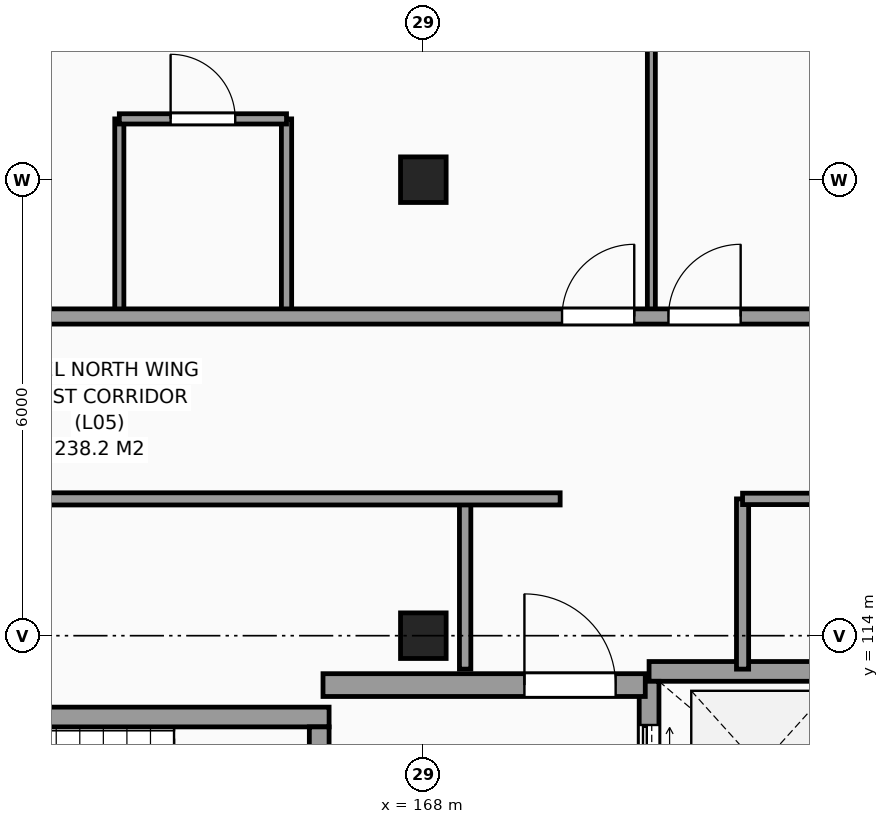
"""IFC4 building model, lengths in metres.
Left out: names, types, materials, properties, quantities, classifications, styles, units other than length and angle.
Written with IfcOpenShell. Run it as: python <this file> out.ifc"""

import sys

from ifc_helpers import new_model, si_unit, direction, frame, frame_2d, origin, origin_2d, place, context, subcontext, project, spatial, rectangle, extrude, element, fill, save


model = new_model("IFC4")
c1 = context("Model", 3, precision=1e-05, world=origin(), true_north=direction((0.0, 1.0)))
c2 = subcontext(c1, "Body", "Model", "MODEL_VIEW")
j1 = project(units=[si_unit("LENGTHUNIT", "METRE"), si_unit("PLANEANGLEUNIT", "RADIAN")], contexts=[c1])
p1 = place(None, origin())
s1 = spatial("IfcSite", under=j1, at=p1, CompositionType="ELEMENT")
p2 = place(p1, origin())
s2 = spatial("IfcBuilding", under=s1, at=p2, CompositionType="ELEMENT")
p3 = place(p2, frame((0.0, 0.0, 24.6)))
s3 = spatial("IfcBuildingStorey", under=s2, at=p3, CompositionType="ELEMENT", Elevation=24.6)
for number, where, z_axis, x_axis in (
    (1, (168.0, 114.0, 0.0), (0.0, 0.0, 1.0), (1.0, 0.0, 0.0)),
    (2, (168.0, 120.0, 0.0), (0.0, 0.0, 1.0), (1.0, 0.0, 0.0)),
):
    element("IfcColumn", number, at=place(p3, frame(where, z_axis=z_axis, x_axis=x_axis)), inside=s3, PredefinedType="COLUMN", context=c2, shape_type="SweptSolid", body=[
        extrude(rectangle(XDim=0.6, YDim=0.6, at=origin_2d()), origin(), (0.0, 0.0, 1.0), 3.6),
    ])
p4 = place(p3, frame((156.04, 112.93, 0.0), z_axis=(0.0, 0.0, 1.0), x_axis=(1.0, 0.0, 0.0)))
e3 = element("IfcWall", 3, at=p4, inside=s3, PredefinedType="SHEAR", context=c2, shape_type="SweptSolid", body=[
    extrude(rectangle(XDim=10.72, YDim=0.26, at=frame_2d((5.36, 0.0))), origin(), (0.0, 0.0, 1.0), 3.6),
])
p5 = place(p3, frame((166.63, 109.2, 0.0), z_axis=(0.0, 0.0, 1.0), x_axis=(0.0, 1.0, 0.0)))
e4 = element("IfcWall", 4, at=p5, inside=s3, PredefinedType="SHEAR", context=c2, shape_type="SweptSolid", body=[
    extrude(rectangle(XDim=3.6, YDim=0.26, at=frame_2d((1.8, 0.0))), origin(), (0.0, 0.0, 1.0), 3.6),
])
p6 = place(p5, frame((1.25, 0.0, 0.0)))
e5 = element("IfcOpeningElement", 5, at=p6, cuts=e4, PredefinedType="OPENING", context=c2, shape_type="SweptSolid", body=[
    extrude(rectangle(XDim=1.1, YDim=2.15, at=frame_2d((0.55, 1.075))), frame((0.0, 0.14, 0.0), z_axis=(0.0, -1.0, 0.0), x_axis=(1.0, 0.0, 0.0)), (0.0, 0.0, 1.0), 0.28),
])
p7 = place(p3, frame((170.97, 113.53, 0.0), z_axis=(0.0, 0.0, 1.0), x_axis=(1.0, 0.0, 0.0)))
e6 = element("IfcWall", 6, at=p7, inside=s3, PredefinedType="SHEAR", context=c2, shape_type="SweptSolid", body=[
    extrude(rectangle(XDim=2.91, YDim=0.26, at=frame_2d((1.455, 0.0))), origin(), (0.0, 0.0, 1.0), 3.6),
])
p8 = place(p3, frame((170.97, 111.15, 0.0), z_axis=(0.0, 0.0, 1.0), x_axis=(0.0, 1.0, 0.0)))
e7 = element("IfcWall", 7, at=p8, inside=s3, PredefinedType="SHEAR", context=c2, shape_type="SweptSolid", body=[
    extrude(rectangle(XDim=2.25, YDim=0.26, at=frame_2d((1.125, 0.0))), origin(), (0.0, 0.0, 1.0), 3.6),
])
p9 = place(p8, frame((0.575, 0.0, 0.0)))
e8 = element("IfcOpeningElement", 8, at=p9, cuts=e7, PredefinedType="OPENING", context=c2, shape_type="SweptSolid", body=[
    extrude(rectangle(XDim=1.1, YDim=2.2, at=frame_2d((0.55, 1.1))), frame((0.0, 0.14, 0.0), z_axis=(0.0, -1.0, 0.0), x_axis=(1.0, 0.0, 0.0)), (0.0, 0.0, 1.0), 0.28),
])
p10 = place(p3, frame((166.68, 113.35, 0.0), z_axis=(0.0, 0.0, 1.0), x_axis=(1.0, 0.0, 0.0)))
e9 = element("IfcWall", 9, at=p10, inside=s3, PredefinedType="SHEAR", context=c2, shape_type="SweptSolid", body=[
    extrude(rectangle(XDim=4.24, YDim=0.3, at=frame_2d((2.12, 0.0))), origin(), (0.0, 0.0, 1.0), 3.6),
])
p11 = place(p10, frame((2.65, 0.0, 0.0)))
e10 = element("IfcOpeningElement", 10, at=p11, cuts=e9, PredefinedType="OPENING", context=c2, shape_type="SweptSolid", body=[
    extrude(rectangle(XDim=1.2, YDim=2.2, at=frame_2d((0.6, 1.1))), frame((0.0, 0.16, 0.0), z_axis=(0.0, -1.0, 0.0), x_axis=(1.0, 0.0, 0.0)), (0.0, 0.0, 1.0), 0.32),
])
p12 = place(p3, frame((164.0, 118.2, 0.0), z_axis=(0.0, 0.0, 1.0), x_axis=(0.0, 1.0, 0.0)))
e11 = element("IfcWall", 11, at=p12, inside=s3, PredefinedType="PARTITIONING", context=c2, shape_type="SweptSolid", body=[
    extrude(rectangle(XDim=2.6, YDim=0.12, at=frame_2d((1.3, 0.0))), origin(), (0.0, 0.0, 1.0), 3.38),
])
p13 = place(p3, frame((166.2, 118.2, 0.0), z_axis=(0.0, 0.0, 1.0), x_axis=(0.0, 1.0, 0.0)))
e12 = element("IfcWall", 12, at=p13, inside=s3, PredefinedType="PARTITIONING", context=c2, shape_type="SweptSolid", body=[
    extrude(rectangle(XDim=2.6, YDim=0.135, at=frame_2d((1.3, 0.0))), origin(), (0.0, 0.0, 1.0), 3.38),
])
p14 = place(p3, frame((168.55, 113.56, 0.0), z_axis=(0.0, 0.0, 1.0), x_axis=(0.0, 1.0, 0.0)))
e13 = element("IfcWall", 13, at=p14, inside=s3, PredefinedType="PARTITIONING", context=c2, shape_type="SweptSolid", body=[
    extrude(rectangle(XDim=2.24, YDim=0.15, at=frame_2d((1.12, 0.0))), origin(), (0.0, 0.0, 1.0), 3.38),
])
p15 = place(p3, frame((171.0, 118.2, 0.0), z_axis=(0.0, 0.0, 1.0), x_axis=(0.0, 1.0, 0.0)))
e14 = element("IfcWall", 14, at=p15, inside=s3, PredefinedType="PARTITIONING", context=c2, shape_type="SweptSolid", body=[
    extrude(rectangle(XDim=7.755, YDim=0.105, at=frame_2d((3.877, 0.0))), origin(), (0.0, 0.0, 1.0), 3.38),
])
p16 = place(p3, frame((172.2, 113.56, 0.0), z_axis=(0.0, 0.0, 1.0), x_axis=(0.0, 1.0, 0.0)))
e15 = element("IfcWall", 15, at=p16, inside=s3, PredefinedType="PARTITIONING", context=c2, shape_type="SweptSolid", body=[
    extrude(rectangle(XDim=2.24, YDim=0.16, at=frame_2d((1.12, 0.0))), origin(), (0.0, 0.0, 1.0), 3.38),
])
p17 = place(p3, frame((66.255, 115.8, 0.0), z_axis=(0.0, 0.0, 1.0), x_axis=(1.0, 0.0, 0.0)))
e16 = element("IfcWall", 16, at=p17, inside=s3, PredefinedType="PARTITIONING", context=c2, shape_type="SweptSolid", body=[
    extrude(rectangle(XDim=103.545, YDim=0.16, at=frame_2d((51.772, 0.0))), origin(), (0.0, 0.0, 1.0), 3.38),
])
p18 = place(p17, frame((80.145, 0.0, 0.0)))
e17 = element("IfcOpeningElement", 17, at=p18, cuts=e16, PredefinedType="OPENING", context=c2, shape_type="SweptSolid", body=[
    extrude(rectangle(XDim=1.2, YDim=2.2, at=frame_2d((0.6, 1.1))), frame((0.0, 0.09, 0.0), z_axis=(0.0, -1.0, 0.0), x_axis=(1.0, 0.0, 0.0)), (0.0, 0.0, 1.0), 0.18),
])
p19 = place(p17, frame((50.145, 0.0, 0.0)))
e18 = element("IfcOpeningElement", 18, at=p19, cuts=e16, PredefinedType="OPENING", context=c2, shape_type="SweptSolid", body=[
    extrude(rectangle(XDim=1.2, YDim=2.2, at=frame_2d((0.6, 1.1))), frame((0.0, 0.09, 0.0), z_axis=(0.0, -1.0, 0.0), x_axis=(1.0, 0.0, 0.0)), (0.0, 0.0, 1.0), 0.18),
])
p20 = place(p17, frame((8.995, 0.0, 0.0)))
e19 = element("IfcOpeningElement", 19, at=p20, cuts=e16, PredefinedType="OPENING", context=c2, shape_type="SweptSolid", body=[
    extrude(rectangle(XDim=1.1, YDim=2.15, at=frame_2d((0.55, 1.075))), frame((0.0, 0.09, 0.0), z_axis=(0.0, -1.0, 0.0), x_axis=(1.0, 0.0, 0.0)), (0.0, 0.0, 1.0), 0.18),
])
p21 = place(p17, frame((55.295, 0.0, 0.0)))
e20 = element("IfcOpeningElement", 20, at=p21, cuts=e16, PredefinedType="OPENING", context=c2, shape_type="SweptSolid", body=[
    extrude(rectangle(XDim=1.0, YDim=2.15, at=frame_2d((0.5, 1.075))), frame((0.0, 0.09, 0.0), z_axis=(0.0, -1.0, 0.0), x_axis=(1.0, 0.0, 0.0)), (0.0, 0.0, 1.0), 0.18),
])
p22 = place(p17, frame((62.265, 0.0, 0.0)))
e21 = element("IfcOpeningElement", 21, at=p22, cuts=e16, PredefinedType="OPENING", context=c2, shape_type="SweptSolid", body=[
    extrude(rectangle(XDim=0.96, YDim=2.15, at=frame_2d((0.48, 1.075))), frame((0.0, 0.09, 0.0), z_axis=(0.0, -1.0, 0.0), x_axis=(1.0, 0.0, 0.0)), (0.0, 0.0, 1.0), 0.18),
])
p23 = place(p17, frame((31.945, 0.0, 0.0)))
e22 = element("IfcOpeningElement", 22, at=p23, cuts=e16, PredefinedType="OPENING", context=c2, shape_type="SweptSolid", body=[
    extrude(rectangle(XDim=1.6, YDim=2.25, at=frame_2d((0.8, 1.125))), frame((0.0, 0.09, 0.0), z_axis=(0.0, -1.0, 0.0), x_axis=(1.0, 0.0, 0.0)), (0.0, 0.0, 1.0), 0.18),
])
p24 = place(p17, frame((18.57, 0.0, 0.0)))
e23 = element("IfcOpeningElement", 23, at=p24, cuts=e16, PredefinedType="OPENING", context=c2, shape_type="SweptSolid", body=[
    extrude(rectangle(XDim=0.95, YDim=2.1, at=frame_2d((0.475, 1.05))), frame((0.0, 0.09, 0.0), z_axis=(0.0, -1.0, 0.0), x_axis=(1.0, 0.0, 0.0)), (0.0, 0.0, 1.0), 0.18),
])
p25 = place(p17, frame((24.57, 0.0, 0.0)))
e24 = element("IfcOpeningElement", 24, at=p25, cuts=e16, PredefinedType="OPENING", context=c2, shape_type="SweptSolid", body=[
    extrude(rectangle(XDim=0.95, YDim=2.1, at=frame_2d((0.475, 1.05))), frame((0.0, 0.09, 0.0), z_axis=(0.0, -1.0, 0.0), x_axis=(1.0, 0.0, 0.0)), (0.0, 0.0, 1.0), 0.18),
])
p26 = place(p17, frame((84.47, 0.0, 0.0)))
e25 = element("IfcOpeningElement", 25, at=p26, cuts=e16, PredefinedType="OPENING", context=c2, shape_type="SweptSolid", body=[
    extrude(rectangle(XDim=0.95, YDim=2.1, at=frame_2d((0.475, 1.05))), frame((0.0, 0.09, 0.0), z_axis=(0.0, -1.0, 0.0), x_axis=(1.0, 0.0, 0.0)), (0.0, 0.0, 1.0), 0.18),
])
p27 = place(p3, frame((172.2, 115.8, 0.0), z_axis=(0.0, 0.0, 1.0), x_axis=(1.0, 0.0, 0.0)))
e26 = element("IfcWall", 26, at=p27, inside=s3, PredefinedType="PARTITIONING", context=c2, shape_type="SweptSolid", body=[
    extrude(rectangle(XDim=4.3, YDim=0.15, at=frame_2d((2.15, 0.0))), origin(), (0.0, 0.0, 1.0), 3.38),
])
p28 = place(p27, frame((2.62, 0.0, 0.0)))
e27 = element("IfcOpeningElement", 27, at=p28, cuts=e26, PredefinedType="OPENING", context=c2, shape_type="SweptSolid", body=[
    extrude(rectangle(XDim=0.96, YDim=2.15, at=frame_2d((0.48, 1.075))), frame((0.0, 0.085, 0.0), z_axis=(0.0, -1.0, 0.0), x_axis=(1.0, 0.0, 0.0)), (0.0, 0.0, 1.0), 0.17),
])
p29 = place(p3, frame((66.255, 118.2, 0.0), z_axis=(0.0, 0.0, 1.0), x_axis=(1.0, 0.0, 0.0)))
e28 = element("IfcWall", 28, at=p29, inside=s3, PredefinedType="PARTITIONING", context=c2, shape_type="SweptSolid", body=[
    extrude(rectangle(XDim=110.245, YDim=0.2, at=frame_2d((55.123, 0.0))), origin(), (0.0, 0.0, 1.0), 3.38),
])
p30 = place(p29, frame((7.57, 0.0, 0.0)))
e29 = element("IfcOpeningElement", 29, at=p30, cuts=e28, PredefinedType="OPENING", context=c2, shape_type="SweptSolid", body=[
    extrude(rectangle(XDim=0.95, YDim=2.1, at=frame_2d((0.475, 1.05))), frame((0.0, 0.11, 0.0), z_axis=(0.0, -1.0, 0.0), x_axis=(1.0, 0.0, 0.0)), (0.0, 0.0, 1.0), 0.22),
])
p31 = place(p29, frame((12.07, 0.0, 0.0)))
e30 = element("IfcOpeningElement", 30, at=p31, cuts=e28, PredefinedType="OPENING", context=c2, shape_type="SweptSolid", body=[
    extrude(rectangle(XDim=0.95, YDim=2.1, at=frame_2d((0.475, 1.05))), frame((0.0, 0.11, 0.0), z_axis=(0.0, -1.0, 0.0), x_axis=(1.0, 0.0, 0.0)), (0.0, 0.0, 1.0), 0.22),
])
p32 = place(p29, frame((16.27, 0.0, 0.0)))
e31 = element("IfcOpeningElement", 31, at=p32, cuts=e28, PredefinedType="OPENING", context=c2, shape_type="SweptSolid", body=[
    extrude(rectangle(XDim=0.95, YDim=2.1, at=frame_2d((0.475, 1.05))), frame((0.0, 0.11, 0.0), z_axis=(0.0, -1.0, 0.0), x_axis=(1.0, 0.0, 0.0)), (0.0, 0.0, 1.0), 0.22),
])
p33 = place(p29, frame((18.47, 0.0, 0.0)))
e32 = element("IfcOpeningElement", 32, at=p33, cuts=e28, PredefinedType="OPENING", context=c2, shape_type="SweptSolid", body=[
    extrude(rectangle(XDim=0.95, YDim=2.1, at=frame_2d((0.475, 1.05))), frame((0.0, 0.11, 0.0), z_axis=(0.0, -1.0, 0.0), x_axis=(1.0, 0.0, 0.0)), (0.0, 0.0, 1.0), 0.22),
])
p34 = place(p29, frame((32.32, 0.0, 0.0)))
e33 = element("IfcOpeningElement", 33, at=p34, cuts=e28, PredefinedType="OPENING", context=c2, shape_type="SweptSolid", body=[
    extrude(rectangle(XDim=0.95, YDim=2.1, at=frame_2d((0.475, 1.05))), frame((0.0, 0.11, 0.0), z_axis=(0.0, -1.0, 0.0), x_axis=(1.0, 0.0, 0.0)), (0.0, 0.0, 1.0), 0.22),
])
p35 = place(p29, frame((36.47, 0.0, 0.0)))
e34 = element("IfcOpeningElement", 34, at=p35, cuts=e28, PredefinedType="OPENING", context=c2, shape_type="SweptSolid", body=[
    extrude(rectangle(XDim=0.95, YDim=2.1, at=frame_2d((0.475, 1.05))), frame((0.0, 0.11, 0.0), z_axis=(0.0, -1.0, 0.0), x_axis=(1.0, 0.0, 0.0)), (0.0, 0.0, 1.0), 0.22),
])
p36 = place(p29, frame((46.27, 0.0, 0.0)))
e35 = element("IfcOpeningElement", 35, at=p36, cuts=e28, PredefinedType="OPENING", context=c2, shape_type="SweptSolid", body=[
    extrude(rectangle(XDim=0.95, YDim=2.1, at=frame_2d((0.475, 1.05))), frame((0.0, 0.11, 0.0), z_axis=(0.0, -1.0, 0.0), x_axis=(1.0, 0.0, 0.0)), (0.0, 0.0, 1.0), 0.22),
])
p37 = place(p29, frame((48.47, 0.0, 0.0)))
e36 = element("IfcOpeningElement", 36, at=p37, cuts=e28, PredefinedType="OPENING", context=c2, shape_type="SweptSolid", body=[
    extrude(rectangle(XDim=0.95, YDim=2.1, at=frame_2d((0.475, 1.05))), frame((0.0, 0.11, 0.0), z_axis=(0.0, -1.0, 0.0), x_axis=(1.0, 0.0, 0.0)), (0.0, 0.0, 1.0), 0.22),
])
p38 = place(p29, frame((52.87, 0.0, 0.0)))
e37 = element("IfcOpeningElement", 37, at=p38, cuts=e28, PredefinedType="OPENING", context=c2, shape_type="SweptSolid", body=[
    extrude(rectangle(XDim=0.95, YDim=2.1, at=frame_2d((0.475, 1.05))), frame((0.0, 0.11, 0.0), z_axis=(0.0, -1.0, 0.0), x_axis=(1.0, 0.0, 0.0)), (0.0, 0.0, 1.0), 0.22),
])
p39 = place(p29, frame((60.07, 0.0, 0.0)))
e38 = element("IfcOpeningElement", 38, at=p39, cuts=e28, PredefinedType="OPENING", context=c2, shape_type="SweptSolid", body=[
    extrude(rectangle(XDim=0.95, YDim=2.1, at=frame_2d((0.475, 1.05))), frame((0.0, 0.11, 0.0), z_axis=(0.0, -1.0, 0.0), x_axis=(1.0, 0.0, 0.0)), (0.0, 0.0, 1.0), 0.22),
])
p40 = place(p29, frame((68.32, 0.0, 0.0)))
e39 = element("IfcOpeningElement", 39, at=p40, cuts=e28, PredefinedType="OPENING", context=c2, shape_type="SweptSolid", body=[
    extrude(rectangle(XDim=0.95, YDim=2.1, at=frame_2d((0.475, 1.05))), frame((0.0, 0.11, 0.0), z_axis=(0.0, -1.0, 0.0), x_axis=(1.0, 0.0, 0.0)), (0.0, 0.0, 1.0), 0.22),
])
p41 = place(p29, frame((80.32, 0.0, 0.0)))
e40 = element("IfcOpeningElement", 40, at=p41, cuts=e28, PredefinedType="OPENING", context=c2, shape_type="SweptSolid", body=[
    extrude(rectangle(XDim=0.95, YDim=2.1, at=frame_2d((0.475, 1.05))), frame((0.0, 0.11, 0.0), z_axis=(0.0, -1.0, 0.0), x_axis=(1.0, 0.0, 0.0)), (0.0, 0.0, 1.0), 0.22),
])
p42 = place(p29, frame((82.87, 0.0, 0.0)))
e41 = element("IfcOpeningElement", 41, at=p42, cuts=e28, PredefinedType="OPENING", context=c2, shape_type="SweptSolid", body=[
    extrude(rectangle(XDim=0.95, YDim=2.1, at=frame_2d((0.475, 1.05))), frame((0.0, 0.11, 0.0), z_axis=(0.0, -1.0, 0.0), x_axis=(1.0, 0.0, 0.0)), (0.0, 0.0, 1.0), 0.22),
])
p43 = place(p29, frame((90.07, 0.0, 0.0)))
e42 = element("IfcOpeningElement", 42, at=p43, cuts=e28, PredefinedType="OPENING", context=c2, shape_type="SweptSolid", body=[
    extrude(rectangle(XDim=0.95, YDim=2.1, at=frame_2d((0.475, 1.05))), frame((0.0, 0.11, 0.0), z_axis=(0.0, -1.0, 0.0), x_axis=(1.0, 0.0, 0.0)), (0.0, 0.0, 1.0), 0.22),
])
p44 = place(p29, frame((94.27, 0.0, 0.0)))
e43 = element("IfcOpeningElement", 43, at=p44, cuts=e28, PredefinedType="OPENING", context=c2, shape_type="SweptSolid", body=[
    extrude(rectangle(XDim=0.95, YDim=2.1, at=frame_2d((0.475, 1.05))), frame((0.0, 0.11, 0.0), z_axis=(0.0, -1.0, 0.0), x_axis=(1.0, 0.0, 0.0)), (0.0, 0.0, 1.0), 0.22),
])
p45 = place(p29, frame((103.57, 0.0, 0.0)))
e44 = element("IfcOpeningElement", 44, at=p45, cuts=e28, PredefinedType="OPENING", context=c2, shape_type="SweptSolid", body=[
    extrude(rectangle(XDim=0.95, YDim=2.1, at=frame_2d((0.475, 1.05))), frame((0.0, 0.11, 0.0), z_axis=(0.0, -1.0, 0.0), x_axis=(1.0, 0.0, 0.0)), (0.0, 0.0, 1.0), 0.22),
])
p46 = place(p29, frame((104.97, 0.0, 0.0)))
e45 = element("IfcOpeningElement", 45, at=p46, cuts=e28, PredefinedType="OPENING", context=c2, shape_type="SweptSolid", body=[
    extrude(rectangle(XDim=0.95, YDim=2.1, at=frame_2d((0.475, 1.05))), frame((0.0, 0.11, 0.0), z_axis=(0.0, -1.0, 0.0), x_axis=(1.0, 0.0, 0.0)), (0.0, 0.0, 1.0), 0.22),
])
p47 = place(p3, frame((164.0, 120.8, 0.0), z_axis=(0.0, 0.0, 1.0), x_axis=(1.0, 0.0, 0.0)))
e46 = element("IfcWall", 46, at=p47, inside=s3, PredefinedType="PARTITIONING", context=c2, shape_type="SweptSolid", body=[
    extrude(rectangle(XDim=2.2, YDim=0.135, at=frame_2d((1.1, 0.0))), origin(), (0.0, 0.0, 1.0), 3.38),
])
p48 = place(p47, frame((0.675, 0.0, 0.0)))
e47 = element("IfcOpeningElement", 47, at=p48, cuts=e46, PredefinedType="OPENING", context=c2, shape_type="SweptSolid", body=[
    extrude(rectangle(XDim=0.85, YDim=2.1, at=frame_2d((0.425, 1.05))), frame((0.0, 0.078, 0.0), z_axis=(0.0, -1.0, 0.0), x_axis=(1.0, 0.0, 0.0)), (0.0, 0.0, 1.0), 0.155),
])
p49 = place(p9, origin())
e48 = element("IfcDoor", 48, at=p49, inside=s3, OperationType="DOUBLE_DOOR_SLIDING", PredefinedType="DOOR", context=c2, shape_type="SweptSolid", body=[
    extrude(rectangle(XDim=1.1, YDim=2.2, at=frame_2d((0.55, 1.1))), frame((0.0, 0.025, 0.0), z_axis=(0.0, -1.0, 0.0), x_axis=(1.0, 0.0, 0.0)), (0.0, 0.0, 1.0), 0.05),
])
fill(e8, e48)
p50 = place(p11, origin())
e49 = element("IfcDoor", 49, at=p50, inside=s3, OperationType="SINGLE_SWING_LEFT", PredefinedType="DOOR", context=c2, shape_type="SweptSolid", body=[
    extrude(rectangle(XDim=1.2, YDim=2.2, at=frame_2d((0.6, 1.1))), frame((0.0, 0.025, 0.0), z_axis=(0.0, -1.0, 0.0), x_axis=(1.0, 0.0, 0.0)), (0.0, 0.0, 1.0), 0.05),
])
fill(e10, e49)
p51 = place(p48, origin())
e50 = element("IfcDoor", 50, at=p51, inside=s3, OperationType="SINGLE_SWING_LEFT", PredefinedType="DOOR", context=c2, shape_type="SweptSolid", body=[
    extrude(rectangle(XDim=0.85, YDim=2.1, at=frame_2d((0.425, 1.05))), frame((0.0, 0.025, 0.0), z_axis=(0.0, -1.0, 0.0), x_axis=(1.0, 0.0, 0.0)), (0.0, 0.0, 1.0), 0.05),
])
fill(e47, e50)
p52 = place(p45, origin())
e51 = element("IfcDoor", 51, at=p52, inside=s3, OperationType="SINGLE_SWING_RIGHT", PredefinedType="DOOR", context=c2, shape_type="SweptSolid", body=[
    extrude(rectangle(XDim=0.95, YDim=2.1, at=frame_2d((0.475, 1.05))), frame((0.0, 0.025, 0.0), z_axis=(0.0, -1.0, 0.0), x_axis=(1.0, 0.0, 0.0)), (0.0, 0.0, 1.0), 0.05),
])
fill(e44, e51)
p53 = place(p46, origin())
e52 = element("IfcDoor", 52, at=p53, inside=s3, OperationType="SINGLE_SWING_RIGHT", PredefinedType="DOOR", context=c2, shape_type="SweptSolid", body=[
    extrude(rectangle(XDim=0.95, YDim=2.1, at=frame_2d((0.475, 1.05))), frame((0.0, 0.025, 0.0), z_axis=(0.0, -1.0, 0.0), x_axis=(1.0, 0.0, 0.0)), (0.0, 0.0, 1.0), 0.05),
])
fill(e45, e52)
save(model, sys.argv[1])
